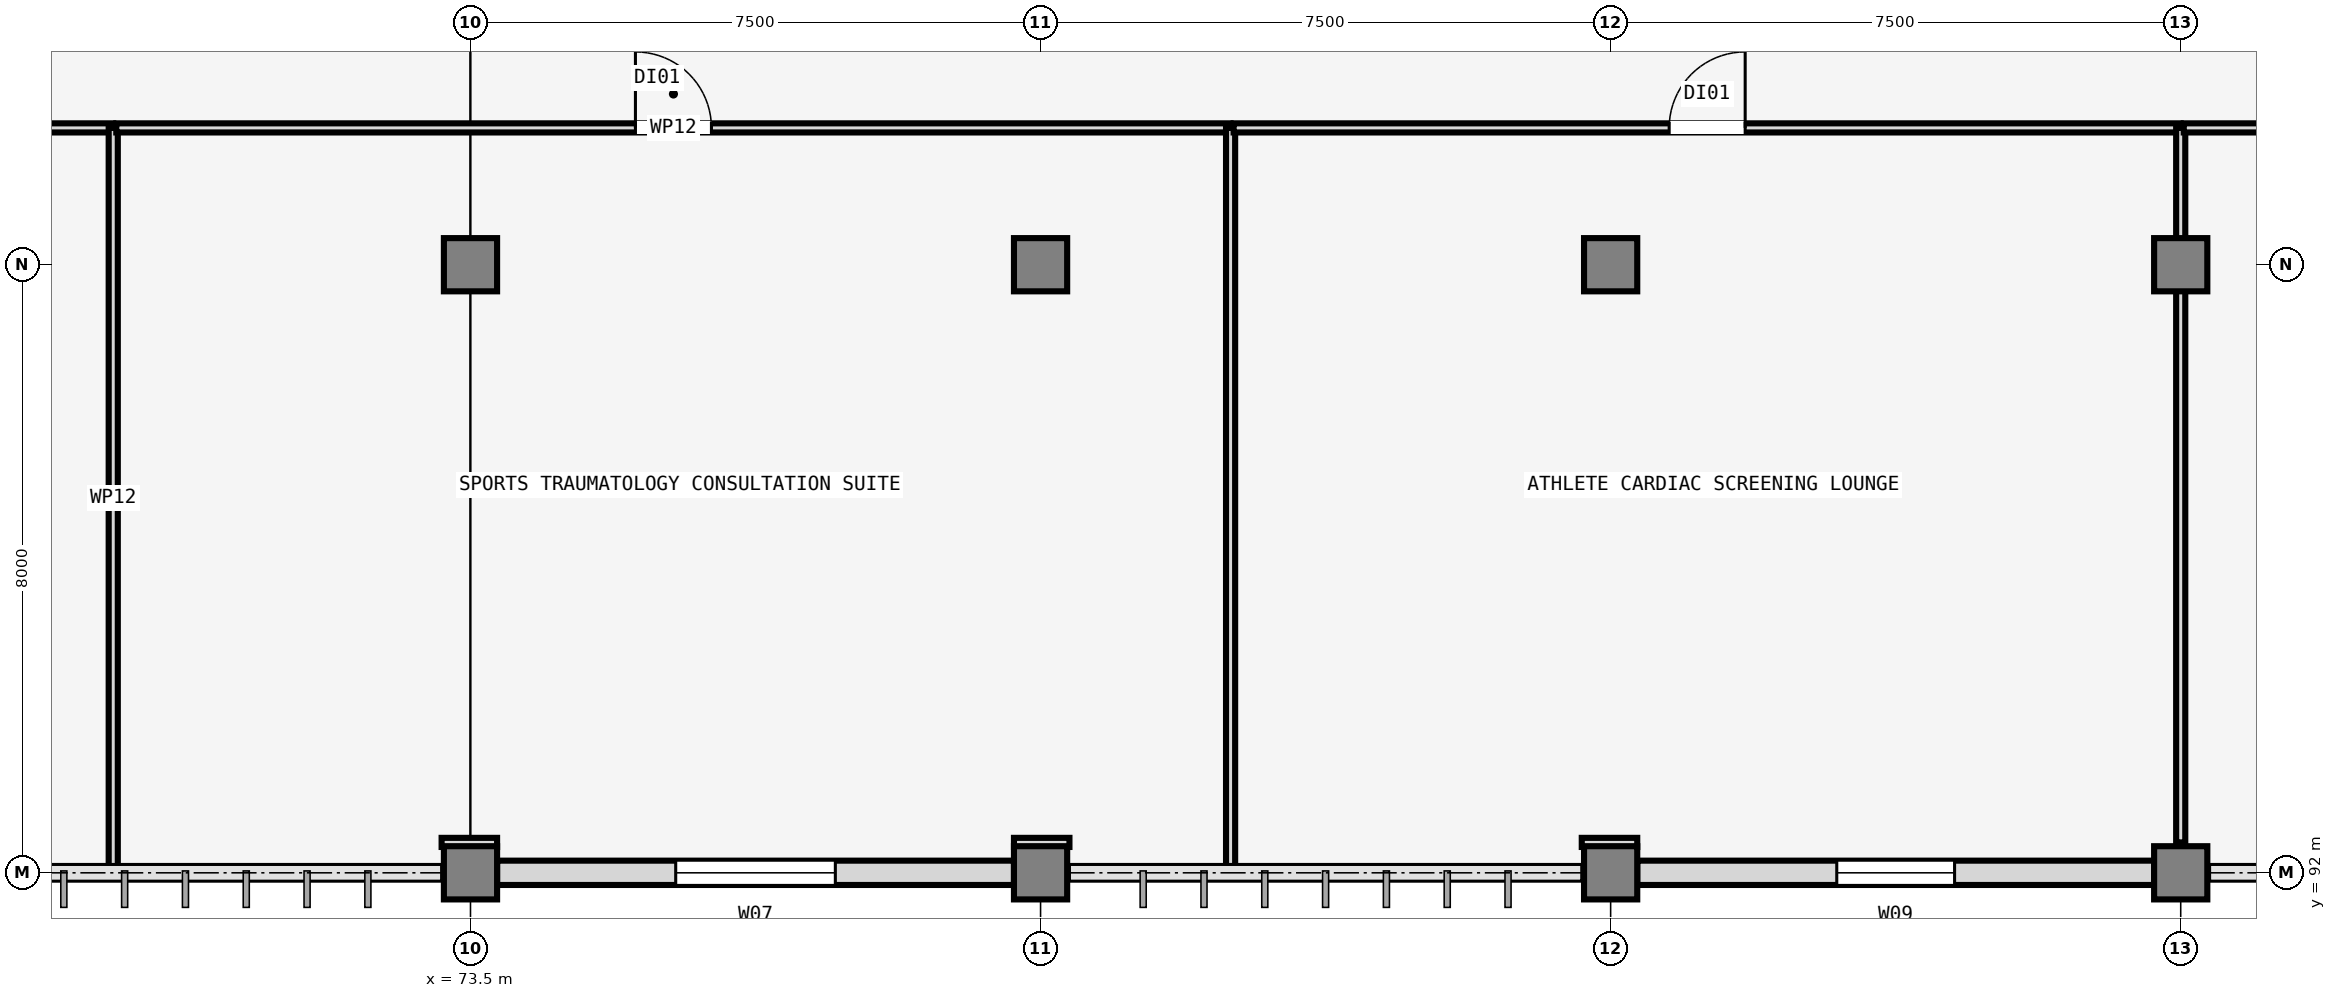
"""IFC4 building model, lengths in metres.
Left out: names, types, materials, properties, quantities, classifications, styles, units other than length and angle.
Written with IfcOpenShell. Run it as: python <this file> out.ifc"""

import sys

from ifc_helpers import new_model, si_unit, direction, frame, frame_2d, origin, origin_2d, place, context, subcontext, project, spatial, rectangle, extrude, element, fill, save


model = new_model("IFC4")
c1 = context("Model", 3, precision=1e-05, world=origin(), true_north=direction((0.0, 1.0)))
c2 = subcontext(c1, "Body", "Model", "MODEL_VIEW")
j1 = project(units=[si_unit("LENGTHUNIT", "METRE"), si_unit("PLANEANGLEUNIT", "RADIAN")], contexts=[c1])
p1 = place(None, origin())
s1 = spatial("IfcSite", under=j1, at=p1, CompositionType="ELEMENT")
p2 = place(p1, origin())
s2 = spatial("IfcBuilding", under=s1, at=p2, CompositionType="ELEMENT")
p3 = place(p2, origin())
s3 = spatial("IfcBuildingStorey", under=s2, at=p3, CompositionType="ELEMENT", Elevation=0.0)
for number, where, z_axis, x_axis in (
    (1, (73.5, 92.0, 0.0), (0.0, 0.0, 1.0), (1.0, 0.0, 0.0)),
    (2, (73.5, 100.0, 0.0), (0.0, 0.0, 1.0), (1.0, 0.0, 0.0)),
    (3, (81.0, 92.0, 0.0), (0.0, 0.0, 1.0), (1.0, 0.0, 0.0)),
    (4, (81.0, 100.0, 0.0), (0.0, 0.0, 1.0), (1.0, 0.0, 0.0)),
    (5, (88.5, 92.0, 0.0), (0.0, 0.0, 1.0), (1.0, 0.0, 0.0)),
    (6, (88.5, 100.0, 0.0), (0.0, 0.0, 1.0), (1.0, 0.0, 0.0)),
    (7, (96.0, 92.0, 0.0), (0.0, 0.0, 1.0), (1.0, 0.0, 0.0)),
    (8, (96.0, 100.0, 0.0), (0.0, 0.0, 1.0), (1.0, 0.0, 0.0)),
):
    element("IfcColumn", number, at=place(p3, frame(where, z_axis=z_axis, x_axis=x_axis)), inside=s3, PredefinedType="COLUMN", context=c2, shape_type="SweptSolid", body=[
        extrude(rectangle(XDim=0.7, YDim=0.7, at=origin_2d()), origin(), (0.0, 0.0, 1.0), 4.8),
    ])
p4 = place(p3, frame((73.85, 92.0, 0.0), z_axis=(0.0, 0.0, 1.0), x_axis=(1.0, 0.0, 0.0)))
e9 = element("IfcWall", 9, at=p4, inside=s3, PredefinedType="SOLIDWALL", context=c2, shape_type="SweptSolid", body=[
    extrude(rectangle(XDim=6.8, YDim=0.32, at=frame_2d((3.4, 0.0))), origin(), (0.0, 0.0, 1.0), 3.93),
])
p5 = place(p4, frame((2.35, 0.0, 0.95)))
e10 = element("IfcOpeningElement", 10, at=p5, cuts=e9, PredefinedType="OPENING", context=c2, shape_type="SweptSolid", body=[
    extrude(rectangle(XDim=2.1, YDim=1.55, at=frame_2d((1.05, 0.775))), frame((0.0, 0.17, 0.0), z_axis=(0.0, -1.0, 0.0), x_axis=(1.0, 0.0, 0.0)), (0.0, 0.0, 1.0), 0.34),
])
p6 = place(p3, frame((88.85, 92.0, 0.0), z_axis=(0.0, 0.0, 1.0), x_axis=(1.0, 0.0, 0.0)))
e11 = element("IfcWall", 11, at=p6, inside=s3, PredefinedType="SOLIDWALL", context=c2, shape_type="SweptSolid", body=[
    extrude(rectangle(XDim=6.8, YDim=0.32, at=frame_2d((3.4, 0.0))), origin(), (0.0, 0.0, 1.0), 3.93),
])
p7 = place(p6, frame((2.625, 0.0, 0.95)))
e12 = element("IfcOpeningElement", 12, at=p7, cuts=e11, PredefinedType="OPENING", context=c2, shape_type="SweptSolid", body=[
    extrude(rectangle(XDim=1.55, YDim=1.45, at=frame_2d((0.775, 0.725))), frame((0.0, 0.17, 0.0), z_axis=(0.0, -1.0, 0.0), x_axis=(1.0, 0.0, 0.0)), (0.0, 0.0, 1.0), 0.34),
])
p8 = place(p3, frame((54.05, 101.8, 0.0), z_axis=(0.0, 0.0, 1.0), x_axis=(1.0, 0.0, 0.0)))
e13 = element("IfcWall", 13, at=p8, inside=s3, PredefinedType="PARTITIONING", context=c2, shape_type="SweptSolid", body=[
    extrude(rectangle(XDim=14.75, YDim=0.12, at=frame_2d((7.375, 0.0))), origin(), (0.0, 0.0, 1.0), 3.68),
])
p9 = place(p8, frame((6.875, 0.0, 0.0)))
e14 = element("IfcOpeningElement", 14, at=p9, cuts=e13, PredefinedType="OPENING", context=c2, shape_type="SweptSolid", body=[
    extrude(rectangle(XDim=1.0, YDim=2.1, at=frame_2d((0.5, 1.05))), frame((0.0, 0.07, 0.0), z_axis=(0.0, -1.0, 0.0), x_axis=(1.0, 0.0, 0.0)), (0.0, 0.0, 1.0), 0.14),
])
p10 = place(p3, frame((68.8, 101.8, 0.0), z_axis=(0.0, 0.0, 1.0), x_axis=(0.0, -1.0, 0.0)))
e15 = element("IfcWall", 15, at=p10, inside=s3, PredefinedType="PARTITIONING", context=c2, shape_type="SweptSolid", body=[
    extrude(rectangle(XDim=9.738, YDim=0.12, at=frame_2d((4.869, 0.0))), origin(), (0.0, 0.0, 1.0), 3.68),
])
p11 = place(p3, frame((68.84, 101.8, 0.0), z_axis=(0.0, 0.0, 1.0), x_axis=(1.0, 0.0, 0.0)))
e16 = element("IfcWall", 16, at=p11, inside=s3, PredefinedType="PARTITIONING", context=c2, shape_type="SweptSolid", body=[
    extrude(rectangle(XDim=14.66, YDim=0.12, at=frame_2d((7.33, 0.0))), origin(), (0.0, 0.0, 1.0), 3.68),
])
p12 = place(p11, frame((6.83, 0.0, 0.0)))
e17 = element("IfcOpeningElement", 17, at=p12, cuts=e16, PredefinedType="OPENING", context=c2, shape_type="SweptSolid", body=[
    extrude(rectangle(XDim=1.0, YDim=2.1, at=frame_2d((0.5, 1.05))), frame((0.0, 0.07, 0.0), z_axis=(0.0, -1.0, 0.0), x_axis=(1.0, 0.0, 0.0)), (0.0, 0.0, 1.0), 0.14),
])
p13 = place(p3, frame((83.5, 101.8, 0.0), z_axis=(0.0, 0.0, 1.0), x_axis=(0.0, -1.0, 0.0)))
e18 = element("IfcWall", 18, at=p13, inside=s3, PredefinedType="PARTITIONING", context=c2, shape_type="SweptSolid", body=[
    extrude(rectangle(XDim=9.738, YDim=0.12, at=frame_2d((4.869, 0.0))), origin(), (0.0, 0.0, 1.0), 3.68),
])
for number, where, z_axis, x_axis in (
    (19, (81.38, 92.4, 0.0), (0.0, 0.0, 1.0), (-1.0, 0.0, 0.0)),
    (20, (73.85, 92.4, 0.0), (0.0, 0.0, 1.0), (-1.0, 0.0, 0.0)),
):
    element("IfcWall", number, at=place(p3, frame(where, z_axis=z_axis, x_axis=x_axis)), inside=s3, PredefinedType="PARTITIONING", context=c2, shape_type="SweptSolid", body=[
        extrude(rectangle(XDim=0.73, YDim=0.12, at=frame_2d((0.365, 0.0))), origin(), (0.0, 0.0, 1.0), 3.68),
    ])
p14 = place(p3, frame((83.54, 101.8, 0.0), z_axis=(0.0, 0.0, 1.0), x_axis=(1.0, 0.0, 0.0)))
e21 = element("IfcWall", 21, at=p14, inside=s3, PredefinedType="PARTITIONING", context=c2, shape_type="SweptSolid", body=[
    extrude(rectangle(XDim=12.46, YDim=0.12, at=frame_2d((6.23, 0.0))), origin(), (0.0, 0.0, 1.0), 3.68),
])
p15 = place(p14, frame((5.73, 0.0, 0.0)))
e22 = element("IfcOpeningElement", 22, at=p15, cuts=e21, PredefinedType="OPENING", context=c2, shape_type="SweptSolid", body=[
    extrude(rectangle(XDim=1.0, YDim=2.1, at=frame_2d((0.5, 1.05))), frame((0.0, 0.07, 0.0), z_axis=(0.0, -1.0, 0.0), x_axis=(1.0, 0.0, 0.0)), (0.0, 0.0, 1.0), 0.14),
])
p16 = place(p3, frame((96.0, 101.8, 0.0), z_axis=(0.0, 0.0, 1.0), x_axis=(0.0, -1.0, 0.0)))
e23 = element("IfcWall", 23, at=p16, inside=s3, PredefinedType="PARTITIONING", context=c2, shape_type="SweptSolid", body=[
    extrude(rectangle(XDim=9.4, YDim=0.12, at=frame_2d((4.7, 0.0))), origin(), (0.0, 0.0, 1.0), 3.68),
])
p17 = place(p3, frame((88.85, 92.4, 0.0), z_axis=(0.0, 0.0, 1.0), x_axis=(-1.0, 0.0, 0.0)))
e24 = element("IfcWall", 24, at=p17, inside=s3, PredefinedType="PARTITIONING", context=c2, shape_type="SweptSolid", body=[
    extrude(rectangle(XDim=0.73, YDim=0.12, at=frame_2d((0.365, 0.0))), origin(), (0.0, 0.0, 1.0), 3.68),
])
p18 = place(p3, frame((96.04, 101.8, 0.0), z_axis=(0.0, 0.0, 1.0), x_axis=(1.0, 0.0, 0.0)))
e25 = element("IfcWall", 25, at=p18, inside=s3, PredefinedType="PARTITIONING", context=c2, shape_type="SweptSolid", body=[
    extrude(rectangle(XDim=37.32, YDim=0.12, at=frame_2d((18.66, 0.0))), origin(), (0.0, 0.0, 1.0), 3.68),
])
p19 = place(p18, frame((11.56, 0.0, 0.0)))
e26 = element("IfcOpeningElement", 26, at=p19, cuts=e25, PredefinedType="OPENING", context=c2, shape_type="SweptSolid", body=[
    extrude(rectangle(XDim=1.0, YDim=2.1, at=frame_2d((0.5, 1.05))), frame((0.0, 0.07, 0.0), z_axis=(0.0, -1.0, 0.0), x_axis=(1.0, 0.0, 0.0)), (0.0, 0.0, 1.0), 0.14),
])
p20 = place(p5, origin())
e27 = element("IfcWindow", 27, at=p20, inside=s3, PartitioningType="SINGLE_PANEL", PredefinedType="WINDOW", context=c2, shape_type="SweptSolid", body=[
    extrude(rectangle(XDim=2.1, YDim=1.55, at=frame_2d((1.05, 0.775))), frame((0.0, 0.03, 0.0), z_axis=(0.0, -1.0, 0.0), x_axis=(1.0, 0.0, 0.0)), (0.0, 0.0, 1.0), 0.06),
])
fill(e10, e27)
p21 = place(p7, origin())
e28 = element("IfcWindow", 28, at=p21, inside=s3, PartitioningType="SINGLE_PANEL", PredefinedType="WINDOW", context=c2, shape_type="SweptSolid", body=[
    extrude(rectangle(XDim=1.55, YDim=1.45, at=frame_2d((0.775, 0.725))), frame((0.0, 0.03, 0.0), z_axis=(0.0, -1.0, 0.0), x_axis=(1.0, 0.0, 0.0)), (0.0, 0.0, 1.0), 0.06),
])
fill(e12, e28)
p22 = place(p12, origin())
e29 = element("IfcDoor", 29, at=p22, inside=s3, OperationType="SINGLE_SWING_LEFT", PredefinedType="DOOR", context=c2, shape_type="SweptSolid", body=[
    extrude(rectangle(XDim=1.0, YDim=2.1, at=frame_2d((0.5, 1.05))), frame((0.0, 0.025, 0.0), z_axis=(0.0, -1.0, 0.0), x_axis=(1.0, 0.0, 0.0)), (0.0, 0.0, 1.0), 0.05),
])
fill(e17, e29)
p23 = place(p15, origin())
e30 = element("IfcDoor", 30, at=p23, inside=s3, OperationType="SINGLE_SWING_RIGHT", PredefinedType="DOOR", context=c2, shape_type="SweptSolid", body=[
    extrude(rectangle(XDim=1.0, YDim=2.1, at=frame_2d((0.5, 1.05))), frame((0.0, 0.025, 0.0), z_axis=(0.0, -1.0, 0.0), x_axis=(1.0, 0.0, 0.0)), (0.0, 0.0, 1.0), 0.05),
])
fill(e22, e30)
save(model, sys.argv[1])
